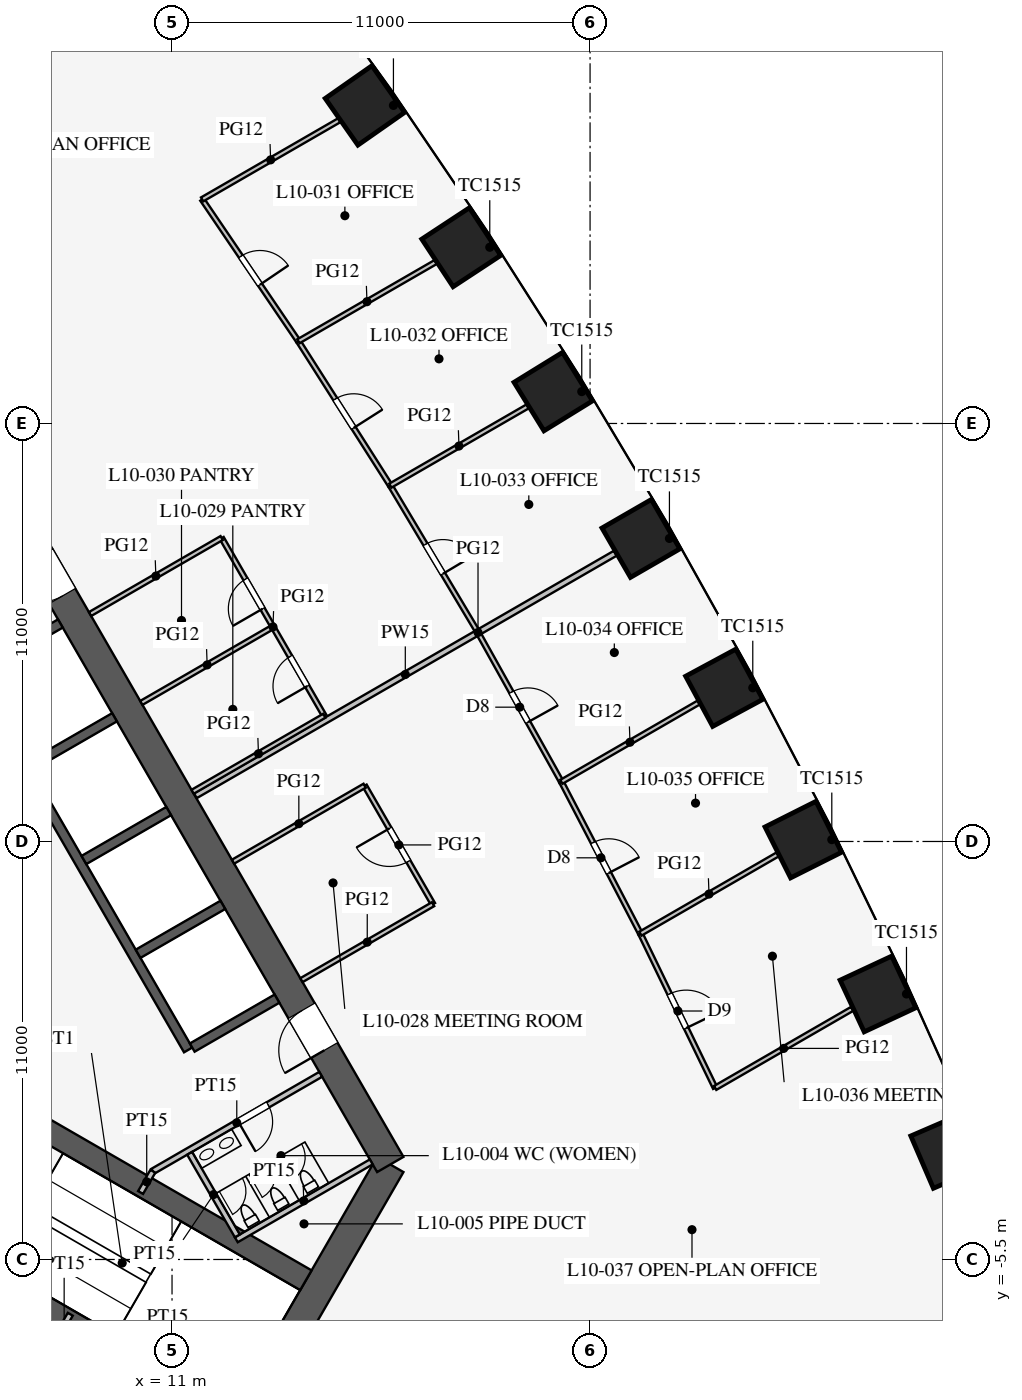
"""IFC4 building model, lengths in metres.
Left out: names, types, materials, properties, quantities, classifications, styles, units other than length and angle.
Written with IfcOpenShell. Run it as: python <this file> out.ifc"""

import sys

from ifc_helpers import new_model, si_unit, direction, frame, frame_2d, origin, origin_2d, place, context, subcontext, project, spatial, rectangle, extrude, element, fill, save


model = new_model("IFC4")
c1 = context("Model", 3, precision=1e-05, world=origin(), true_north=direction((0.0, 1.0)))
c2 = subcontext(c1, "Body", "Model", "MODEL_VIEW")
j1 = project(units=[si_unit("LENGTHUNIT", "METRE"), si_unit("PLANEANGLEUNIT", "RADIAN")], contexts=[c1])
p1 = place(None, origin())
s1 = spatial("IfcSite", under=j1, at=p1, CompositionType="ELEMENT")
p2 = place(p1, origin())
s2 = spatial("IfcBuilding", under=s1, at=p2, CompositionType="ELEMENT")
p3 = place(p2, frame((0.0, 0.0, 45.9)))
s3 = spatial("IfcBuildingStorey", under=s2, at=p3, CompositionType="ELEMENT", Elevation=45.9)
for number, where, z_axis, x_axis in (
    (1, (31.426, -2.641, 0.0), (0.0, 0.0, 1.0), (-0.396, 0.918, 0.0)),
    (2, (29.576, 1.487, 0.0), (0.0, 0.0, 1.0), (-0.423, 0.906, 0.0)),
    (3, (27.611, 5.549, 0.0), (0.0, 0.0, 1.0), (-0.449, 0.894, 0.0)),
    (4, (25.531, 9.544, 0.0), (0.0, 0.0, 1.0), (-0.475, 0.88, 0.0)),
    (5, (23.338, 13.474, 0.0), (0.0, 0.0, 1.0), (-0.5, 0.866, 0.0)),
    (6, (21.031, 17.339, 0.0), (0.0, 0.0, 1.0), (-0.525, 0.851, 0.0)),
    (7, (18.611, 21.137, 0.0), (0.0, 0.0, 1.0), (-0.549, 0.836, 0.0)),
    (8, (16.076, 24.87, 0.0), (0.0, 0.0, 1.0), (-0.574, 0.819, 0.0)),
):
    element("IfcColumn", number, at=place(p3, frame(where, z_axis=z_axis, x_axis=x_axis)), inside=s3, PredefinedType="COLUMN", context=c2, shape_type="SweptSolid", body=[
        extrude(rectangle(XDim=1.5, YDim=1.5, at=origin_2d()), origin(), (0.0, 0.0, 1.0), 4.2),
    ])
p4 = place(p3, frame((10.97, -13.0, 0.0), z_axis=(0.0, 0.0, 1.0), x_axis=(0.499995765644, 0.866027848477, 0.0)))
e9 = element("IfcWall", 9, at=p4, inside=s3, PredefinedType="SHEAR", context=c2, shape_type="SweptSolid", body=[
    extrude(rectangle(XDim=11.547, YDim=0.8, at=frame_2d((5.773, 0.0))), origin(), (0.0, 0.0, 1.0), 4.2),
])
p5 = place(p3, frame((16.743, -3.0, 0.0), z_axis=(0.0, 0.0, 1.0), x_axis=(-0.500002442456, 0.866023993627, 0.0)))
e10 = element("IfcWall", 10, at=p5, inside=s3, PredefinedType="SHEAR", context=c2, shape_type="SweptSolid", body=[
    extrude(rectangle(XDim=21.939, YDim=0.8, at=frame_2d((10.97, 0.0))), origin(), (0.0, 0.0, 1.0), 4.2),
])
p6 = place(p5, frame((17.27, 0.0, 0.0)))
e11 = element("IfcOpeningElement", 11, at=p6, cuts=e10, PredefinedType="OPENING", context=c2, shape_type="SweptSolid", body=[
    extrude(rectangle(XDim=1.2, YDim=2.1, at=frame_2d((0.6, 1.05))), frame((0.0, 0.41, 0.0), z_axis=(0.0, -1.0, 0.0), x_axis=(1.0, 0.0, 0.0)), (0.0, 0.0, 1.0), 0.82),
])
p7 = place(p5, frame((3.47, 0.0, 0.0)))
e12 = element("IfcOpeningElement", 12, at=p7, cuts=e10, PredefinedType="OPENING", context=c2, shape_type="SweptSolid", body=[
    extrude(rectangle(XDim=1.2, YDim=2.1, at=frame_2d((0.6, 1.05))), frame((0.0, 0.41, 0.0), z_axis=(0.0, -1.0, 0.0), x_axis=(1.0, 0.0, 0.0)), (0.0, 0.0, 1.0), 0.82),
])
p8 = place(p3, frame((11.424, 0.014, 0.0), z_axis=(0.0, 0.0, 1.0), x_axis=(-0.500001763848, 0.866024385424, 0.0)))
e13 = element("IfcWall", 13, at=p8, inside=s3, PredefinedType="SHEAR", context=c2, shape_type="SweptSolid", body=[
    extrude(rectangle(XDim=11.4, YDim=0.25, at=frame_2d((5.7, 0.0))), origin(), (0.0, 0.0, 1.0), 4.2),
])
for number, where, z_axis, x_axis in (
    (14, (11.532, 0.076, 0.0), (0.0, 0.0, 1.0), (0.866, 0.5, 0.0)),
    (15, (10.107, 2.544, 0.0), (0.0, 0.0, 1.0), (0.866, 0.5, 0.0)),
    (16, (8.682, 5.012, 0.0), (0.0, 0.0, 1.0), (0.866, 0.5, 0.0)),
    (17, (7.257, 7.481, 0.0), (0.0, 0.0, 1.0), (0.866, 0.5, 0.0)),
):
    element("IfcWall", number, at=place(p3, frame(where, z_axis=z_axis, x_axis=x_axis)), inside=s3, PredefinedType="SHEAR", context=c2, shape_type="SweptSolid", body=[
        extrude(rectangle(XDim=2.575, YDim=0.25, at=frame_2d((1.288, 0.0))), origin(), (0.0, 0.0, 1.0), 4.2),
    ])
p9 = place(p3, frame((5.832, 9.949, 0.0), z_axis=(0.0, 0.0, 1.0), x_axis=(0.866029291668, 0.499993265928, 0.0)))
e18 = element("IfcWall", 18, at=p9, inside=s3, PredefinedType="SHEAR", context=c2, shape_type="SweptSolid", body=[
    extrude(rectangle(XDim=2.575, YDim=0.25, at=frame_2d((1.288, 0.0))), origin(), (0.0, 0.0, 1.0), 4.2),
])
for number, where, z_axis, x_axis in (
    (19, (4.638, -5.016, 0.0), (0.0, 0.0, 1.0), (0.866, -0.5, 0.0)),
    (20, (6.663, -1.509, 0.0), (0.0, 0.0, 1.0), (0.866, -0.5, 0.0)),
):
    element("IfcWall", number, at=place(p3, frame(where, z_axis=z_axis, x_axis=x_axis)), inside=s3, PredefinedType="SHEAR", context=c2, shape_type="SweptSolid", body=[
        extrude(rectangle(XDim=9.075, YDim=0.6, at=frame_2d((4.538, 0.0))), origin(), (0.0, 0.0, 1.0), 4.2),
    ])
p10 = place(p3, frame((10.495, -3.178, 0.0), z_axis=(0.0, 0.0, 1.0), x_axis=(0.86602216432, 0.500005610874, 0.0)))
e21 = element("IfcWall", 21, at=p10, inside=s3, PredefinedType="PARTITIONING", context=c2, shape_type="SweptSolid", body=[
    extrude(rectangle(XDim=5.1, YDim=0.15, at=frame_2d((2.55, 0.0))), origin(), (0.0, 0.0, 1.0), 4.0),
])
p11 = place(p10, frame((2.6, 0.0, 0.0)))
e22 = element("IfcOpeningElement", 22, at=p11, cuts=e21, PredefinedType="OPENING", context=c2, shape_type="SweptSolid", body=[
    extrude(rectangle(XDim=0.9, YDim=2.1, at=frame_2d((0.45, 1.05))), frame((0.0, 0.085, 0.0), z_axis=(0.0, -1.0, 0.0), x_axis=(1.0, 0.0, 0.0)), (0.0, 0.0, 1.0), 0.17),
])
for number, where, z_axis, x_axis in (
    (23, (8.0, -7.5, 0.0), (0.0, 0.0, 1.0), (0.5, 0.866, 0.0)),
    (24, (10.495, -3.178, 0.0), (0.0, 0.0, 1.0), (-0.5, -0.866, 0.0)),
):
    element("IfcWall", number, at=place(p3, frame(where, z_axis=z_axis, x_axis=x_axis)), inside=s3, PredefinedType="PARTITIONING", context=c2, shape_type="SweptSolid", body=[
        extrude(rectangle(XDim=0.645, YDim=0.15, at=frame_2d((0.323, 0.0))), origin(), (0.0, 0.0, 1.0), 4.0),
    ])
p12 = place(p3, frame((12.691, -4.982, 0.0), z_axis=(0.0, 0.0, 1.0), x_axis=(0.8660249478, 0.500000789788, 0.0)))
e25 = element("IfcWall", 25, at=p12, inside=s3, PredefinedType="PARTITIONING", context=c2, shape_type="SweptSolid", body=[
    extrude(rectangle(XDim=4.1, YDim=0.15, at=frame_2d((2.05, 0.0))), origin(), (0.0, 0.0, 1.0), 4.0),
])
p13 = place(p3, frame((11.464, -2.706, 0.0), z_axis=(0.0, 0.0, 1.0), x_axis=(0.50001992892, -0.866013897511, 0.0)))
e26 = element("IfcWall", 26, at=p13, inside=s3, PredefinedType="PARTITIONING", context=c2, shape_type="SweptSolid", body=[
    extrude(rectangle(XDim=2.51, YDim=0.15, at=frame_2d((1.255, 0.0))), origin(), (0.0, 0.0, 1.0), 4.0),
])
p14 = place(p3, frame((11.613, 6.705, 0.0), z_axis=(0.0, 0.0, 1.0), x_axis=(0.86602785495, 0.499995754432, 0.0)))
e27 = element("IfcWall", 27, at=p14, inside=s3, PredefinedType="PARTITIONING", context=c2, shape_type="SweptSolid", body=[
    extrude(rectangle(XDim=12.759, YDim=0.15, at=frame_2d((6.379, 0.0))), origin(), (0.0, 0.0, 1.0), 3.2),
])
p15 = place(p3, frame((15.006, 8.808, 0.0), z_axis=(0.0, 0.0, 1.0), x_axis=(-0.500048589285, 0.86599734893, 0.0)))
e28 = element("IfcWall", 28, at=p15, inside=s3, PredefinedType="PARTITIONING", context=c2, shape_type="SweptSolid", body=[
    extrude(rectangle(XDim=2.7, YDim=0.12, at=frame_2d((1.35, 0.0))), origin(), (0.0, 0.0, 1.0), 2.9),
])
p16 = place(p15, frame((0.9, 0.0, 0.15)))
e29 = element("IfcOpeningElement", 29, at=p16, cuts=e28, PredefinedType="OPENING", context=c2, shape_type="SweptSolid", body=[
    extrude(rectangle(XDim=0.9, YDim=2.1, at=frame_2d((0.45, 1.05))), frame((0.0, 0.07, 0.0), z_axis=(0.0, -1.0, 0.0), x_axis=(1.0, 0.0, 0.0)), (0.0, 0.0, 1.0), 0.14),
])
p17 = place(p3, frame((13.656, 11.146, 0.0), z_axis=(0.0, 0.0, 1.0), x_axis=(-0.4999416173, 0.866059108428, 0.0)))
e30 = element("IfcWall", 30, at=p17, inside=s3, PredefinedType="PARTITIONING", context=c2, shape_type="SweptSolid", body=[
    extrude(rectangle(XDim=2.7, YDim=0.12, at=frame_2d((1.35, 0.0))), origin(), (0.0, 0.0, 1.0), 2.9),
])
p18 = place(p17, frame((0.55, 0.0, 0.15)))
e31 = element("IfcOpeningElement", 31, at=p18, cuts=e30, PredefinedType="OPENING", context=c2, shape_type="SweptSolid", body=[
    extrude(rectangle(XDim=0.9, YDim=2.1, at=frame_2d((0.45, 1.05))), frame((0.0, 0.07, 0.0), z_axis=(0.0, -1.0, 0.0), x_axis=(1.0, 0.0, 0.0)), (0.0, 0.0, 1.0), 0.14),
])
p19 = place(p3, frame((17.869, 3.85, 0.0), z_axis=(0.0, 0.0, 1.0), x_axis=(-0.500012057535, 0.866018442252, 0.0)))
e32 = element("IfcWall", 32, at=p19, inside=s3, PredefinedType="PARTITIONING", context=c2, shape_type="SweptSolid", body=[
    extrude(rectangle(XDim=3.6, YDim=0.12, at=frame_2d((1.8, 0.0))), origin(), (0.0, 0.0, 1.0), 2.9),
])
p20 = place(p19, frame((1.3, 0.0, 0.15)))
e33 = element("IfcOpeningElement", 33, at=p20, cuts=e32, PredefinedType="OPENING", context=c2, shape_type="SweptSolid", body=[
    extrude(rectangle(XDim=1.0, YDim=2.1, at=frame_2d((0.5, 1.05))), frame((0.0, 0.07, 0.0), z_axis=(0.0, -1.0, 0.0), x_axis=(1.0, 0.0, 0.0)), (0.0, 0.0, 1.0), 0.14),
])
for number, where, z_axis, x_axis in (
    (34, (11.542, 6.808, 0.0), (0.0, 0.0, 1.0), (0.866, 0.5, 0.0)),
    (35, (10.192, 9.146, 0.0), (0.0, 0.0, 1.0), (0.866, 0.5, 0.0)),
    (36, (8.842, 11.485, 0.0), (0.0, 0.0, 1.0), (0.866, 0.5, 0.0)),
    (37, (12.605, 4.968, 0.0), (0.0, 0.0, 1.0), (0.866, 0.5, 0.0)),
    (38, (14.405, 1.85, 0.0), (0.0, 0.0, 1.0), (0.866, 0.5, 0.0)),
):
    element("IfcWall", number, at=place(p3, frame(where, z_axis=z_axis, x_axis=x_axis)), inside=s3, PredefinedType="PARTITIONING", context=c2, shape_type="SweptSolid", body=[
        extrude(rectangle(XDim=4.0, YDim=0.12, at=frame_2d((2.0, 0.0))), origin(), (0.0, 0.0, 1.0), 2.9),
    ])
p21 = place(p3, frame((19.052, 10.999, 0.0), z_axis=(0.0, 0.0, 1.0), x_axis=(-0.51252396108, 0.858672923364, 0.0)))
e39 = element("IfcWall", 39, at=p21, inside=s3, PredefinedType="PARTITIONING", context=c2, shape_type="SweptSolid", body=[
    extrude(rectangle(XDim=4.5, YDim=0.12, at=frame_2d((2.25, 0.0))), origin(), (0.0, 0.0, 1.0), 2.9),
])
p22 = place(p21, frame((1.8, 0.0, 0.15)))
e40 = element("IfcOpeningElement", 40, at=p22, cuts=e39, PredefinedType="OPENING", context=c2, shape_type="SweptSolid", body=[
    extrude(rectangle(XDim=0.9, YDim=2.1, at=frame_2d((0.45, 1.05))), frame((0.0, 0.07, 0.0), z_axis=(0.0, -1.0, 0.0), x_axis=(1.0, 0.0, 0.0)), (0.0, 0.0, 1.0), 0.14),
])
p23 = place(p3, frame((16.745, 14.864, 0.0), z_axis=(0.0, 0.0, 1.0), x_axis=(-0.537205132487, 0.843451626135, 0.0)))
e41 = element("IfcWall", 41, at=p23, inside=s3, PredefinedType="PARTITIONING", context=c2, shape_type="SweptSolid", body=[
    extrude(rectangle(XDim=4.504, YDim=0.12, at=frame_2d((2.252, 0.0))), origin(), (0.0, 0.0, 1.0), 2.9),
])
p24 = place(p23, frame((1.8, 0.0, 0.15)))
e42 = element("IfcOpeningElement", 42, at=p24, cuts=e41, PredefinedType="OPENING", context=c2, shape_type="SweptSolid", body=[
    extrude(rectangle(XDim=0.9, YDim=2.1, at=frame_2d((0.45, 1.05))), frame((0.0, 0.07, 0.0), z_axis=(0.0, -1.0, 0.0), x_axis=(1.0, 0.0, 0.0)), (0.0, 0.0, 1.0), 0.14),
])
p25 = place(p3, frame((14.325, 18.663, 0.0), z_axis=(0.0, 0.0, 1.0), x_axis=(-0.561512004239, 0.827468591002, 0.0)))
e43 = element("IfcWall", 43, at=p25, inside=s3, PredefinedType="PARTITIONING", context=c2, shape_type="SweptSolid", body=[
    extrude(rectangle(XDim=4.512, YDim=0.12, at=frame_2d((2.256, 0.0))), origin(), (0.0, 0.0, 1.0), 2.9),
])
p26 = place(p25, frame((1.8, 0.0, 0.15)))
e44 = element("IfcOpeningElement", 44, at=p26, cuts=e43, PredefinedType="OPENING", context=c2, shape_type="SweptSolid", body=[
    extrude(rectangle(XDim=0.9, YDim=2.1, at=frame_2d((0.45, 1.05))), frame((0.0, 0.07, 0.0), z_axis=(0.0, -1.0, 0.0), x_axis=(1.0, 0.0, 0.0)), (0.0, 0.0, 1.0), 0.14),
])
p27 = place(p3, frame((25.292, -0.986, 0.0), z_axis=(0.0, 0.0, 1.0), x_axis=(-0.435857917556, 0.900015486369, 0.0)))
e45 = element("IfcWall", 45, at=p27, inside=s3, PredefinedType="PARTITIONING", context=c2, shape_type="SweptSolid", body=[
    extrude(rectangle(XDim=4.512, YDim=0.12, at=frame_2d((2.256, 0.0))), origin(), (0.0, 0.0, 1.0), 2.9),
])
p28 = place(p27, frame((1.75, 0.0, 0.15)))
e46 = element("IfcOpeningElement", 46, at=p28, cuts=e45, PredefinedType="OPENING", context=c2, shape_type="SweptSolid", body=[
    extrude(rectangle(XDim=1.0, YDim=2.1, at=frame_2d((0.5, 1.05))), frame((0.0, 0.07, 0.0), z_axis=(0.0, -1.0, 0.0), x_axis=(1.0, 0.0, 0.0)), (0.0, 0.0, 1.0), 0.14),
])
p29 = place(p3, frame((21.245, 7.07, 0.0), z_axis=(0.0, 0.0, 1.0), x_axis=(-0.487373854787, 0.873193406795, 0.0)))
e47 = element("IfcWall", 47, at=p29, inside=s3, PredefinedType="PARTITIONING", context=c2, shape_type="SweptSolid", body=[
    extrude(rectangle(XDim=4.5, YDim=0.12, at=frame_2d((2.25, 0.0))), origin(), (0.0, 0.0, 1.0), 2.9),
])
p30 = place(p29, frame((1.8, 0.0, 0.15)))
e48 = element("IfcOpeningElement", 48, at=p30, cuts=e47, PredefinedType="OPENING", context=c2, shape_type="SweptSolid", body=[
    extrude(rectangle(XDim=0.9, YDim=2.1, at=frame_2d((0.45, 1.05))), frame((0.0, 0.07, 0.0), z_axis=(0.0, -1.0, 0.0), x_axis=(1.0, 0.0, 0.0)), (0.0, 0.0, 1.0), 0.14),
])
p31 = place(p3, frame((23.325, 3.074, 0.0), z_axis=(0.0, 0.0, 1.0), x_axis=(-0.461852697957, 0.886956642339, 0.0)))
e49 = element("IfcWall", 49, at=p31, inside=s3, PredefinedType="PARTITIONING", context=c2, shape_type="SweptSolid", body=[
    extrude(rectangle(XDim=4.504, YDim=0.12, at=frame_2d((2.252, 0.0))), origin(), (0.0, 0.0, 1.0), 2.9),
])
p32 = place(p31, frame((1.8, 0.0, 0.15)))
e50 = element("IfcOpeningElement", 50, at=p32, cuts=e49, PredefinedType="OPENING", context=c2, shape_type="SweptSolid", body=[
    extrude(rectangle(XDim=0.9, YDim=2.1, at=frame_2d((0.45, 1.05))), frame((0.0, 0.07, 0.0), z_axis=(0.0, -1.0, 0.0), x_axis=(1.0, 0.0, 0.0)), (0.0, 0.0, 1.0), 0.14),
])
p33 = place(p3, frame((11.792, 22.396, 0.0), z_axis=(0.0, 0.0, 1.0), x_axis=(0.866011781705, 0.500023593391, 0.0)))
e51 = element("IfcWall", 51, at=p33, inside=s3, PredefinedType="PARTITIONING", context=c2, shape_type="SweptSolid", body=[
    extrude(rectangle(XDim=4.164, YDim=0.12, at=frame_2d((2.082, 0.0))), origin(), (0.0, 0.0, 1.0), 2.9),
])
p34 = place(p3, frame((16.745, 14.864, 0.0), z_axis=(0.0, 0.0, 1.0), x_axis=(0.866025669538, 0.499999539701, 0.0)))
e52 = element("IfcWall", 52, at=p34, inside=s3, PredefinedType="PARTITIONING", context=c2, shape_type="SweptSolid", body=[
    extrude(rectangle(XDim=4.169, YDim=0.12, at=frame_2d((2.085, 0.0))), origin(), (0.0, 0.0, 1.0), 2.9),
])
p35 = place(p3, frame((14.325, 18.663, 0.0), z_axis=(0.0, 0.0, 1.0), x_axis=(0.866009971343, 0.50002672882, 0.0)))
e53 = element("IfcWall", 53, at=p35, inside=s3, PredefinedType="PARTITIONING", context=c2, shape_type="SweptSolid", body=[
    extrude(rectangle(XDim=4.167, YDim=0.12, at=frame_2d((2.083, 0.0))), origin(), (0.0, 0.0, 1.0), 2.9),
])
p36 = place(p3, frame((25.292, -0.986, 0.0), z_axis=(0.0, 0.0, 1.0), x_axis=(0.866011781705, 0.500023593391, 0.0)))
e54 = element("IfcWall", 54, at=p36, inside=s3, PredefinedType="PARTITIONING", context=c2, shape_type="SweptSolid", body=[
    extrude(rectangle(XDim=4.164, YDim=0.12, at=frame_2d((2.082, 0.0))), origin(), (0.0, 0.0, 1.0), 2.9),
])
p37 = place(p3, frame((21.245, 7.07, 0.0), z_axis=(0.0, 0.0, 1.0), x_axis=(0.866025669538, 0.499999539701, 0.0)))
e55 = element("IfcWall", 55, at=p37, inside=s3, PredefinedType="PARTITIONING", context=c2, shape_type="SweptSolid", body=[
    extrude(rectangle(XDim=4.169, YDim=0.12, at=frame_2d((2.085, 0.0))), origin(), (0.0, 0.0, 1.0), 2.9),
])
p38 = place(p3, frame((23.325, 3.074, 0.0), z_axis=(0.0, 0.0, 1.0), x_axis=(0.866009971343, 0.50002672882, 0.0)))
e56 = element("IfcWall", 56, at=p38, inside=s3, PredefinedType="PARTITIONING", context=c2, shape_type="SweptSolid", body=[
    extrude(rectangle(XDim=4.167, YDim=0.12, at=frame_2d((2.083, 0.0))), origin(), (0.0, 0.0, 1.0), 2.9),
])
p39 = place(p11, frame((0.9, 0.0, 0.0), z_axis=(0.0, 0.0, 1.0), x_axis=(-1.0, 0.0, 0.0)))
e57 = element("IfcDoor", 57, at=p39, inside=s3, OperationType="SINGLE_SWING_RIGHT", PredefinedType="DOOR", context=c2, shape_type="SweptSolid", body=[
    extrude(rectangle(XDim=0.9, YDim=2.1, at=frame_2d((0.45, 1.05))), frame((0.0, 0.025, 0.0), z_axis=(0.0, -1.0, 0.0), x_axis=(1.0, 0.0, 0.0)), (0.0, 0.0, 1.0), 0.05),
])
fill(e22, e57)
p40 = place(p6, origin())
e58 = element("IfcDoor", 58, at=p40, inside=s3, OperationType="SINGLE_SWING_RIGHT", PredefinedType="DOOR", context=c2, shape_type="SweptSolid", body=[
    extrude(rectangle(XDim=1.2, YDim=2.1, at=frame_2d((0.6, 1.05))), frame((0.0, 0.025, 0.0), z_axis=(0.0, -1.0, 0.0), x_axis=(1.0, 0.0, 0.0)), (0.0, 0.0, 1.0), 0.05),
])
fill(e11, e58)
p41 = place(p7, origin())
e59 = element("IfcDoor", 59, at=p41, inside=s3, OperationType="SINGLE_SWING_LEFT", PredefinedType="DOOR", context=c2, shape_type="SweptSolid", body=[
    extrude(rectangle(XDim=1.2, YDim=2.1, at=frame_2d((0.6, 1.05))), frame((0.0, 0.025, 0.0), z_axis=(0.0, -1.0, 0.0), x_axis=(1.0, 0.0, 0.0)), (0.0, 0.0, 1.0), 0.05),
])
fill(e12, e59)
p42 = place(p20, origin())
e60 = element("IfcDoor", 60, at=p42, inside=s3, OperationType="SINGLE_SWING_RIGHT", PredefinedType="DOOR", context=c2, shape_type="SweptSolid", body=[
    extrude(rectangle(XDim=1.0, YDim=2.1, at=frame_2d((0.5, 1.05))), frame((0.0, 0.025, 0.0), z_axis=(0.0, -1.0, 0.0), x_axis=(1.0, 0.0, 0.0)), (0.0, 0.0, 1.0), 0.05),
])
fill(e33, e60)
p43 = place(p16, origin())
e61 = element("IfcDoor", 61, at=p43, inside=s3, OperationType="SINGLE_SWING_LEFT", PredefinedType="DOOR", context=c2, shape_type="SweptSolid", body=[
    extrude(rectangle(XDim=0.9, YDim=2.1, at=frame_2d((0.45, 1.05))), frame((0.0, 0.025, 0.0), z_axis=(0.0, -1.0, 0.0), x_axis=(1.0, 0.0, 0.0)), (0.0, 0.0, 1.0), 0.05),
])
fill(e29, e61)
p44 = place(p18, origin())
e62 = element("IfcDoor", 62, at=p44, inside=s3, OperationType="SINGLE_SWING_LEFT", PredefinedType="DOOR", context=c2, shape_type="SweptSolid", body=[
    extrude(rectangle(XDim=0.9, YDim=2.1, at=frame_2d((0.45, 1.05))), frame((0.0, 0.025, 0.0), z_axis=(0.0, -1.0, 0.0), x_axis=(1.0, 0.0, 0.0)), (0.0, 0.0, 1.0), 0.05),
])
fill(e31, e62)
p45 = place(p26, frame((0.9, 0.0, 0.0), z_axis=(0.0, 0.0, 1.0), x_axis=(-1.0, 0.0, 0.0)))
e63 = element("IfcDoor", 63, at=p45, inside=s3, OperationType="SINGLE_SWING_RIGHT", PredefinedType="DOOR", context=c2, shape_type="SweptSolid", body=[
    extrude(rectangle(XDim=0.9, YDim=2.1, at=frame_2d((0.45, 1.05))), frame((0.0, 0.025, 0.0), z_axis=(0.0, -1.0, 0.0), x_axis=(1.0, 0.0, 0.0)), (0.0, 0.0, 1.0), 0.05),
])
fill(e44, e63)
p46 = place(p24, frame((0.9, 0.0, 0.0), z_axis=(0.0, 0.0, 1.0), x_axis=(-1.0, 0.0, 0.0)))
e64 = element("IfcDoor", 64, at=p46, inside=s3, OperationType="SINGLE_SWING_RIGHT", PredefinedType="DOOR", context=c2, shape_type="SweptSolid", body=[
    extrude(rectangle(XDim=0.9, YDim=2.1, at=frame_2d((0.45, 1.05))), frame((0.0, 0.025, 0.0), z_axis=(0.0, -1.0, 0.0), x_axis=(1.0, 0.0, 0.0)), (0.0, 0.0, 1.0), 0.05),
])
fill(e42, e64)
p47 = place(p22, frame((0.9, 0.0, 0.0), z_axis=(0.0, 0.0, 1.0), x_axis=(-1.0, 0.0, 0.0)))
e65 = element("IfcDoor", 65, at=p47, inside=s3, OperationType="SINGLE_SWING_RIGHT", PredefinedType="DOOR", context=c2, shape_type="SweptSolid", body=[
    extrude(rectangle(XDim=0.9, YDim=2.1, at=frame_2d((0.45, 1.05))), frame((0.0, 0.025, 0.0), z_axis=(0.0, -1.0, 0.0), x_axis=(1.0, 0.0, 0.0)), (0.0, 0.0, 1.0), 0.05),
])
fill(e40, e65)
p48 = place(p30, frame((0.9, 0.0, 0.0), z_axis=(0.0, 0.0, 1.0), x_axis=(-1.0, 0.0, 0.0)))
e66 = element("IfcDoor", 66, at=p48, inside=s3, OperationType="SINGLE_SWING_RIGHT", PredefinedType="DOOR", context=c2, shape_type="SweptSolid", body=[
    extrude(rectangle(XDim=0.9, YDim=2.1, at=frame_2d((0.45, 1.05))), frame((0.0, 0.025, 0.0), z_axis=(0.0, -1.0, 0.0), x_axis=(1.0, 0.0, 0.0)), (0.0, 0.0, 1.0), 0.05),
])
fill(e48, e66)
p49 = place(p32, frame((0.9, 0.0, 0.0), z_axis=(0.0, 0.0, 1.0), x_axis=(-1.0, 0.0, 0.0)))
e67 = element("IfcDoor", 67, at=p49, inside=s3, OperationType="SINGLE_SWING_RIGHT", PredefinedType="DOOR", context=c2, shape_type="SweptSolid", body=[
    extrude(rectangle(XDim=0.9, YDim=2.1, at=frame_2d((0.45, 1.05))), frame((0.0, 0.025, 0.0), z_axis=(0.0, -1.0, 0.0), x_axis=(1.0, 0.0, 0.0)), (0.0, 0.0, 1.0), 0.05),
])
fill(e50, e67)
p50 = place(p28, frame((1.0, 0.0, 0.0), z_axis=(0.0, 0.0, 1.0), x_axis=(-1.0, 0.0, 0.0)))
e68 = element("IfcDoor", 68, at=p50, inside=s3, OperationType="SINGLE_SWING_RIGHT", PredefinedType="DOOR", context=c2, shape_type="SweptSolid", body=[
    extrude(rectangle(XDim=1.0, YDim=2.1, at=frame_2d((0.5, 1.05))), frame((0.0, 0.025, 0.0), z_axis=(0.0, -1.0, 0.0), x_axis=(1.0, 0.0, 0.0)), (0.0, 0.0, 1.0), 0.05),
])
fill(e46, e68)
save(model, sys.argv[1])
